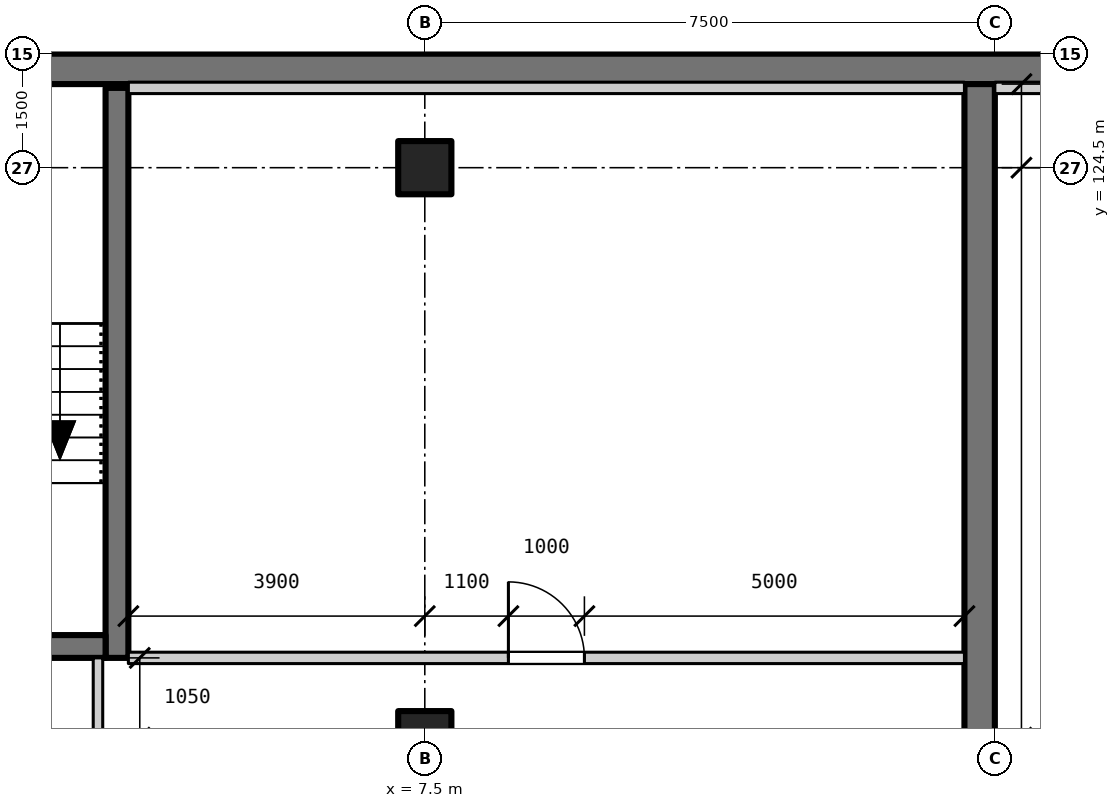
"""IFC4 building model, lengths in metres.
Left out: names, types, materials, properties, quantities, classifications, styles, units other than length and angle.
Written with IfcOpenShell. Run it as: python <this file> out.ifc"""

import sys

from ifc_helpers import new_model, si_unit, direction, frame, frame_2d, origin, origin_2d, place, context, subcontext, project, spatial, rectangle, extrude, element, fill, save


model = new_model("IFC4")
c1 = context("Model", 3, precision=1e-05, world=origin(), true_north=direction((0.0, 1.0)))
c2 = subcontext(c1, "Body", "Model", "MODEL_VIEW")
j1 = project(units=[si_unit("LENGTHUNIT", "METRE"), si_unit("PLANEANGLEUNIT", "RADIAN")], contexts=[c1])
p1 = place(None, origin())
s1 = spatial("IfcSite", under=j1, at=p1, CompositionType="ELEMENT")
p2 = place(p1, origin())
s2 = spatial("IfcBuilding", under=s1, at=p2, CompositionType="ELEMENT")
p3 = place(p2, frame((0.0, 0.0, -10.0)))
s3 = spatial("IfcBuildingStorey", under=s2, at=p3, CompositionType="ELEMENT", Elevation=-10.0)
for number, where, z_axis, x_axis in (
    (1, (7.5, 117.0, -1.4), (0.0, 0.0, 1.0), (1.0, 0.0, 0.0)),
    (2, (7.5, 124.5, -1.4), (0.0, 0.0, 1.0), (1.0, 0.0, 0.0)),
):
    element("IfcColumn", number, at=place(p3, frame(where, z_axis=z_axis, x_axis=x_axis)), inside=s3, PredefinedType="COLUMN", context=c2, shape_type="SweptSolid", body=[
        extrude(rectangle(XDim=0.7, YDim=0.7, at=origin_2d()), origin(), (0.0, 0.0, 1.0), 6.4),
    ])
p4 = place(p3, frame((0.4, 125.8, -1.4), z_axis=(0.0, 0.0, 1.0), x_axis=(1.0, 0.0, 0.0)))
e3 = element("IfcWall", 3, at=p4, inside=s3, PredefinedType="SOLIDWALL", context=c2, shape_type="SweptSolid", body=[
    extrude(rectangle(XDim=57.2, YDim=0.4, at=frame_2d((28.6, 0.0))), origin(), (0.0, 0.0, 1.0), 6.4),
])
p5 = place(p3, frame((14.8, 99.0, -1.4), z_axis=(0.0, 0.0, 1.0), x_axis=(0.0, 1.0, 0.0)))
e4 = element("IfcWall", 4, at=p5, inside=s3, PredefinedType="SHEAR", context=c2, shape_type="SweptSolid", body=[
    extrude(rectangle(XDim=26.6, YDim=0.4, at=frame_2d((13.3, 0.0))), origin(), (0.0, 0.0, 1.0), 6.4),
])
p6 = place(p5, frame((13.95, 0.0, 1.4)))
e5 = element("IfcOpeningElement", 5, at=p6, cuts=e4, PredefinedType="OPENING", context=c2, shape_type="SweptSolid", body=[
    extrude(rectangle(XDim=1.4, YDim=2.4, at=frame_2d((0.7, 1.2))), frame((0.0, 0.21, 0.0), z_axis=(0.0, -1.0, 0.0), x_axis=(1.0, 0.0, 0.0)), (0.0, 0.0, 1.0), 0.42),
])
p7 = place(p3, frame((3.45, 118.05, 0.0), z_axis=(0.0, 0.0, 1.0), x_axis=(0.0, 1.0, 0.0)))
e6 = element("IfcWall", 6, at=p7, inside=s3, PredefinedType="SHEAR", context=c2, shape_type="SweptSolid", body=[
    extrude(rectangle(XDim=7.5, YDim=0.3, at=frame_2d((3.75, 0.0))), origin(), (0.0, 0.0, 1.0), 5.0),
])
p8 = place(p3, frame((0.3, 118.2, 0.0), z_axis=(0.0, 0.0, 1.0), x_axis=(1.0, 0.0, 0.0)))
e7 = element("IfcWall", 7, at=p8, inside=s3, PredefinedType="SHEAR", context=c2, shape_type="SweptSolid", body=[
    extrude(rectangle(XDim=3.0, YDim=0.3, at=frame_2d((1.5, 0.0))), origin(), (0.0, 0.0, 1.0), 5.0),
])
p9 = place(p8, frame((0.95, 0.0, 0.0)))
e8 = element("IfcOpeningElement", 8, at=p9, cuts=e7, PredefinedType="OPENING", context=c2, shape_type="SweptSolid", body=[
    extrude(rectangle(XDim=1.1, YDim=2.1, at=frame_2d((0.55, 1.05))), frame((0.0, 0.16, 0.0), z_axis=(0.0, -1.0, 0.0), x_axis=(1.0, 0.0, 0.0)), (0.0, 0.0, 1.0), 0.32),
])
p10 = place(p3, frame((3.6, 118.05, 0.0), z_axis=(0.0, 0.0, 1.0), x_axis=(1.0, 0.0, 0.0)))
e9 = element("IfcWall", 9, at=p10, inside=s3, PredefinedType="PARTITIONING", context=c2, shape_type="SweptSolid", body=[
    extrude(rectangle(XDim=11.0, YDim=0.15, at=frame_2d((5.5, 0.0))), origin(), (0.0, 0.0, 1.0), 4.75),
])
p11 = place(p10, frame((5.0, 0.0, 0.0)))
e10 = element("IfcOpeningElement", 10, at=p11, cuts=e9, PredefinedType="OPENING", context=c2, shape_type="SweptSolid", body=[
    extrude(rectangle(XDim=1.0, YDim=2.1, at=frame_2d((0.5, 1.05))), frame((0.0, 0.085, 0.0), z_axis=(0.0, -1.0, 0.0), x_axis=(1.0, 0.0, 0.0)), (0.0, 0.0, 1.0), 0.17),
])
p12 = place(p3, frame((3.6, 125.55, 0.0), z_axis=(0.0, 0.0, 1.0), x_axis=(1.0, 0.0, 0.0)))
e11 = element("IfcWall", 11, at=p12, inside=s3, PredefinedType="PARTITIONING", context=c2, shape_type="SweptSolid", body=[
    extrude(rectangle(XDim=11.0, YDim=0.15, at=frame_2d((5.5, 0.0))), origin(), (0.0, 0.0, 1.0), 4.75),
])
p13 = place(p3, frame((15.0, 125.55, 0.0), z_axis=(0.0, 0.0, 1.0), x_axis=(1.0, 0.0, 0.0)))
e12 = element("IfcWall", 12, at=p13, inside=s3, PredefinedType="PARTITIONING", context=c2, shape_type="SweptSolid", body=[
    extrude(rectangle(XDim=14.03, YDim=0.15, at=frame_2d((7.015, 0.0))), origin(), (0.0, 0.0, 1.0), 4.75),
])
p14 = place(p3, frame((3.2, 112.3, 0.0), z_axis=(0.0, 0.0, 1.0), x_axis=(0.0, 1.0, 0.0)))
e13 = element("IfcWall", 13, at=p14, inside=s3, PredefinedType="PARTITIONING", context=c2, shape_type="SweptSolid", body=[
    extrude(rectangle(XDim=5.75, YDim=0.125, at=frame_2d((2.875, 0.0))), origin(), (0.0, 0.0, 1.0), 4.75),
])
p15 = place(p14, frame((2.35, 0.0, 0.0)))
e14 = element("IfcOpeningElement", 14, at=p15, cuts=e13, PredefinedType="OPENING", context=c2, shape_type="SweptSolid", body=[
    extrude(rectangle(XDim=1.1, YDim=2.1, at=frame_2d((0.55, 1.05))), frame((0.0, 0.073, 0.0), z_axis=(0.0, -1.0, 0.0), x_axis=(1.0, 0.0, 0.0)), (0.0, 0.0, 1.0), 0.145),
])
p16 = place(p11, origin())
e15 = element("IfcDoor", 15, at=p16, inside=s3, OperationType="SINGLE_SWING_LEFT", PredefinedType="DOOR", context=c2, shape_type="SweptSolid", body=[
    extrude(rectangle(XDim=1.0, YDim=2.1, at=frame_2d((0.5, 1.05))), frame((0.0, 0.025, 0.0), z_axis=(0.0, -1.0, 0.0), x_axis=(1.0, 0.0, 0.0)), (0.0, 0.0, 1.0), 0.05),
])
fill(e10, e15)
save(model, sys.argv[1])
